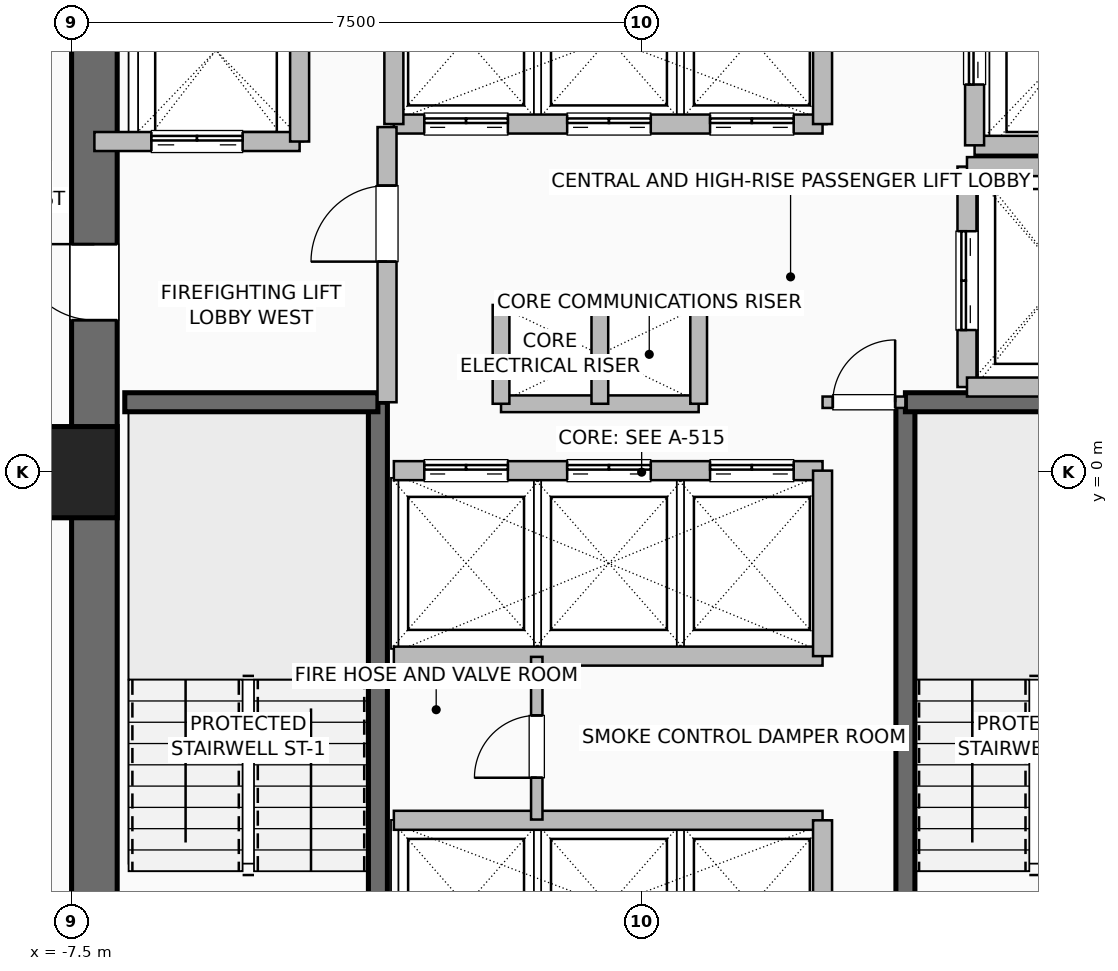
"""IFC4 building model, lengths in metres.
Left out: names, types, materials, properties, quantities, classifications, styles, units other than length and angle.
Written with IfcOpenShell. Run it as: python <this file> out.ifc"""

import sys

from ifc_helpers import new_model, si_unit, direction, frame, frame_2d, origin, origin_2d, place, context, subcontext, project, spatial, rectangle, hollow_rectangle, extrude, element, fill, save


model = new_model("IFC4")
c1 = context("Model", 3, precision=1e-05, world=origin(), true_north=direction((0.0, 1.0)))
c2 = subcontext(c1, "Body", "Model", "MODEL_VIEW")
j1 = project(units=[si_unit("LENGTHUNIT", "METRE"), si_unit("PLANEANGLEUNIT", "RADIAN")], contexts=[c1])
p1 = place(None, origin())
s1 = spatial("IfcSite", under=j1, at=p1, CompositionType="ELEMENT")
p2 = place(p1, origin())
s2 = spatial("IfcBuilding", under=s1, at=p2, CompositionType="ELEMENT")
p3 = place(p2, frame((0.0, 0.0, 55.0)))
s3 = spatial("IfcBuildingStorey", under=s2, at=p3, CompositionType="ELEMENT", Elevation=55.0)
p4 = place(p3, frame((-7.5, 0.0, 0.0), z_axis=(0.0, 0.0, 1.0), x_axis=(1.0, 0.0, 0.0)))
e1 = element("IfcColumn", 1, at=p4, inside=s3, PredefinedType="COLUMN", context=c2, shape_type="SweptSolid", body=[
    extrude(hollow_rectangle(XDim=1.2, YDim=1.2, WallThickness=0.055, at=origin_2d()), origin(), (0.0, 0.0, 1.0), 3.5),
])
p5 = place(p3, frame((-7.2, -7.5, 0.0), z_axis=(0.0, 0.0, 1.0), x_axis=(0.0, 1.0, 0.0)))
e2 = element("IfcWall", 2, at=p5, inside=s3, PredefinedType="SHEAR", context=c2, shape_type="SweptSolid", body=[
    extrude(rectangle(XDim=15.0, YDim=0.6, at=frame_2d((7.5, 0.0))), origin(), (0.0, 0.0, 1.0), 3.25),
])
p6 = place(p5, frame((9.5, 0.0, 0.0)))
e3 = element("IfcOpeningElement", 3, at=p6, cuts=e2, PredefinedType="OPENING", context=c2, shape_type="SweptSolid", body=[
    extrude(rectangle(XDim=1.0, YDim=2.08, at=frame_2d((0.5, 1.04))), frame((0.0, 0.31, 0.0), z_axis=(0.0, -1.0, 0.0), x_axis=(1.0, 0.0, 0.0)), (0.0, 0.0, 1.0), 0.62),
])
p7 = place(p3, frame((-3.47, -6.8, 0.0), z_axis=(0.0, 0.0, 1.0), x_axis=(0.0, 1.0, 0.0)))
e4 = element("IfcWall", 4, at=p7, inside=s3, PredefinedType="SHEAR", context=c2, shape_type="SweptSolid", body=[
    extrude(rectangle(XDim=7.72, YDim=0.25, at=frame_2d((3.86, 0.0))), origin(), (0.0, 0.0, 1.0), 3.25),
])
p8 = place(p3, frame((-6.8, 0.92, 0.0), z_axis=(0.0, 0.0, 1.0), x_axis=(1.0, 0.0, 0.0)))
e5 = element("IfcWall", 5, at=p8, inside=s3, PredefinedType="SHEAR", context=c2, shape_type="SweptSolid", body=[
    extrude(rectangle(XDim=3.33, YDim=0.25, at=frame_2d((1.665, 0.0))), origin(), (0.0, 0.0, 1.0), 3.25),
])
p9 = place(p3, frame((3.47, -6.8, 0.0), z_axis=(0.0, 0.0, 1.0), x_axis=(0.0, 1.0, 0.0)))
e6 = element("IfcWall", 6, at=p9, inside=s3, PredefinedType="SHEAR", context=c2, shape_type="SweptSolid", body=[
    extrude(rectangle(XDim=7.72, YDim=0.25, at=frame_2d((3.86, 0.0))), origin(), (0.0, 0.0, 1.0), 3.25),
])
p10 = place(p3, frame((3.47, 0.92, 0.0), z_axis=(0.0, 0.0, 1.0), x_axis=(1.0, 0.0, 0.0)))
e7 = element("IfcWall", 7, at=p10, inside=s3, PredefinedType="SHEAR", context=c2, shape_type="SweptSolid", body=[
    extrude(rectangle(XDim=3.33, YDim=0.25, at=frame_2d((1.665, 0.0))), origin(), (0.0, 0.0, 1.0), 3.25),
])
for number, where, z_axis, x_axis in (
    (8, (-1.85, 2.2, 0.0), (0.0, 0.0, 1.0), (1.0, 0.0, 0.0)),
    (9, (-1.85, 0.9, 0.0), (0.0, 0.0, 1.0), (1.0, 0.0, 0.0)),
):
    element("IfcWall", number, at=place(p3, frame(where, z_axis=z_axis, x_axis=x_axis)), inside=s3, PredefinedType="PARTITIONING", context=c2, shape_type="SweptSolid", body=[
        extrude(rectangle(XDim=2.6, YDim=0.22, at=frame_2d((1.3, 0.0))), origin(), (0.0, 0.0, 1.0), 3.25),
    ])
for number, where, z_axis, x_axis in (
    (10, (-0.55, 0.9, 0.0), (0.0, 0.0, 1.0), (0.0, 1.0, 0.0)),
    (11, (0.75, 0.9, 0.0), (0.0, 0.0, 1.0), (0.0, 1.0, 0.0)),
    (12, (-1.85, 0.9, 0.0), (0.0, 0.0, 1.0), (0.0, 1.0, 0.0)),
):
    element("IfcWall", number, at=place(p3, frame(where, z_axis=z_axis, x_axis=x_axis)), inside=s3, PredefinedType="PARTITIONING", context=c2, shape_type="SweptSolid", body=[
        extrude(rectangle(XDim=1.3, YDim=0.22, at=frame_2d((0.65, 0.0))), origin(), (0.0, 0.0, 1.0), 3.25),
    ])
p11 = place(p3, frame((-3.26, -4.58, 0.0), z_axis=(0.0, 0.0, 1.0), x_axis=(1.0, 0.0, 0.0)))
e13 = element("IfcWall", 13, at=p11, inside=s3, PredefinedType="SHEAR", context=c2, shape_type="SweptSolid", body=[
    extrude(rectangle(XDim=5.64, YDim=0.25, at=frame_2d((2.82, 0.0))), origin(), (0.0, 0.0, 1.0), 3.25),
])
p12 = place(p3, frame((2.38, -6.8, 0.0), z_axis=(0.0, 0.0, 1.0), x_axis=(0.0, 1.0, 0.0)))
e14 = element("IfcWall", 14, at=p12, inside=s3, PredefinedType="SHEAR", context=c2, shape_type="SweptSolid", body=[
    extrude(rectangle(XDim=2.22, YDim=0.25, at=frame_2d((1.11, 0.0))), origin(), (0.0, 0.0, 1.0), 3.25),
])
p13 = place(p3, frame((-3.26, 0.02, 0.0), z_axis=(0.0, 0.0, 1.0), x_axis=(1.0, 0.0, 0.0)))
e15 = element("IfcWall", 15, at=p13, inside=s3, PredefinedType="SHEAR", context=c2, shape_type="SweptSolid", body=[
    extrude(rectangle(XDim=5.64, YDim=0.25, at=frame_2d((2.82, 0.0))), origin(), (0.0, 0.0, 1.0), 3.25),
])
p14 = place(p13, frame((0.4, 0.0, 0.0)))
e16 = element("IfcOpeningElement", 16, at=p14, cuts=e15, PredefinedType="OPENING", context=c2, shape_type="SweptSolid", body=[
    extrude(rectangle(XDim=1.1, YDim=2.2, at=frame_2d((0.55, 1.1))), frame((0.0, 0.135, 0.0), z_axis=(0.0, -1.0, 0.0), x_axis=(1.0, 0.0, 0.0)), (0.0, 0.0, 1.0), 0.27),
])
p15 = place(p13, frame((2.28, 0.0, 0.0)))
e17 = element("IfcOpeningElement", 17, at=p15, cuts=e15, PredefinedType="OPENING", context=c2, shape_type="SweptSolid", body=[
    extrude(rectangle(XDim=1.1, YDim=2.2, at=frame_2d((0.55, 1.1))), frame((0.0, 0.135, 0.0), z_axis=(0.0, -1.0, 0.0), x_axis=(1.0, 0.0, 0.0)), (0.0, 0.0, 1.0), 0.27),
])
p16 = place(p13, frame((4.16, 0.0, 0.0)))
e18 = element("IfcOpeningElement", 18, at=p16, cuts=e15, PredefinedType="OPENING", context=c2, shape_type="SweptSolid", body=[
    extrude(rectangle(XDim=1.1, YDim=2.2, at=frame_2d((0.55, 1.1))), frame((0.0, 0.135, 0.0), z_axis=(0.0, -1.0, 0.0), x_axis=(1.0, 0.0, 0.0)), (0.0, 0.0, 1.0), 0.27),
])
p17 = place(p3, frame((-3.26, -2.42, 0.0), z_axis=(0.0, 0.0, 1.0), x_axis=(1.0, 0.0, 0.0)))
e19 = element("IfcWall", 19, at=p17, inside=s3, PredefinedType="SHEAR", context=c2, shape_type="SweptSolid", body=[
    extrude(rectangle(XDim=5.64, YDim=0.25, at=frame_2d((2.82, 0.0))), origin(), (0.0, 0.0, 1.0), 3.25),
])
p18 = place(p3, frame((2.38, -2.42, 0.0), z_axis=(0.0, 0.0, 1.0), x_axis=(0.0, 1.0, 0.0)))
e20 = element("IfcWall", 20, at=p18, inside=s3, PredefinedType="SHEAR", context=c2, shape_type="SweptSolid", body=[
    extrude(rectangle(XDim=2.44, YDim=0.25, at=frame_2d((1.22, 0.0))), origin(), (0.0, 0.0, 1.0), 3.25),
])
p19 = place(p3, frame((-3.26, 4.58, 0.0), z_axis=(0.0, 0.0, 1.0), x_axis=(1.0, 0.0, 0.0)))
e21 = element("IfcWall", 21, at=p19, inside=s3, PredefinedType="SHEAR", context=c2, shape_type="SweptSolid", body=[
    extrude(rectangle(XDim=5.64, YDim=0.25, at=frame_2d((2.82, 0.0))), origin(), (0.0, 0.0, 1.0), 3.25),
])
p20 = place(p19, frame((0.4, 0.0, 0.0)))
e22 = element("IfcOpeningElement", 22, at=p20, cuts=e21, PredefinedType="OPENING", context=c2, shape_type="SweptSolid", body=[
    extrude(rectangle(XDim=1.1, YDim=2.2, at=frame_2d((0.55, 1.1))), frame((0.0, 0.135, 0.0), z_axis=(0.0, -1.0, 0.0), x_axis=(1.0, 0.0, 0.0)), (0.0, 0.0, 1.0), 0.27),
])
p21 = place(p19, frame((2.28, 0.0, 0.0)))
e23 = element("IfcOpeningElement", 23, at=p21, cuts=e21, PredefinedType="OPENING", context=c2, shape_type="SweptSolid", body=[
    extrude(rectangle(XDim=1.1, YDim=2.2, at=frame_2d((0.55, 1.1))), frame((0.0, 0.135, 0.0), z_axis=(0.0, -1.0, 0.0), x_axis=(1.0, 0.0, 0.0)), (0.0, 0.0, 1.0), 0.27),
])
p22 = place(p19, frame((4.16, 0.0, 0.0)))
e24 = element("IfcOpeningElement", 24, at=p22, cuts=e21, PredefinedType="OPENING", context=c2, shape_type="SweptSolid", body=[
    extrude(rectangle(XDim=1.1, YDim=2.2, at=frame_2d((0.55, 1.1))), frame((0.0, 0.135, 0.0), z_axis=(0.0, -1.0, 0.0), x_axis=(1.0, 0.0, 0.0)), (0.0, 0.0, 1.0), 0.27),
])
for number, where, z_axis, x_axis in (
    (25, (-3.26, 4.58, 0.0), (0.0, 0.0, 1.0), (0.0, 1.0, 0.0)),
    (26, (2.38, 4.58, 0.0), (0.0, 0.0, 1.0), (0.0, 1.0, 0.0)),
):
    element("IfcWall", number, at=place(p3, frame(where, z_axis=z_axis, x_axis=x_axis)), inside=s3, PredefinedType="SHEAR", context=c2, shape_type="SweptSolid", body=[
        extrude(rectangle(XDim=2.22, YDim=0.25, at=frame_2d((1.11, 0.0))), origin(), (0.0, 0.0, 1.0), 3.25),
    ])
p23 = place(p3, frame((-7.2, 4.35, 0.0), z_axis=(0.0, 0.0, 1.0), x_axis=(1.0, 0.0, 0.0)))
e27 = element("IfcWall", 27, at=p23, inside=s3, PredefinedType="SHEAR", context=c2, shape_type="SweptSolid", body=[
    extrude(rectangle(XDim=2.7, YDim=0.25, at=frame_2d((1.35, 0.0))), origin(), (0.0, 0.0, 1.0), 3.25),
])
p24 = place(p23, frame((0.75, 0.0, 0.0)))
e28 = element("IfcOpeningElement", 28, at=p24, cuts=e27, PredefinedType="OPENING", context=c2, shape_type="SweptSolid", body=[
    extrude(rectangle(XDim=1.2, YDim=2.2, at=frame_2d((0.6, 1.1))), frame((0.0, 0.135, 0.0), z_axis=(0.0, -1.0, 0.0), x_axis=(1.0, 0.0, 0.0)), (0.0, 0.0, 1.0), 0.27),
])
p25 = place(p3, frame((-4.5, 4.35, 0.0), z_axis=(0.0, 0.0, 1.0), x_axis=(0.0, 1.0, 0.0)))
e29 = element("IfcWall", 29, at=p25, inside=s3, PredefinedType="SHEAR", context=c2, shape_type="SweptSolid", body=[
    extrude(rectangle(XDim=2.85, YDim=0.25, at=frame_2d((1.425, 0.0))), origin(), (0.0, 0.0, 1.0), 3.25),
])
p26 = place(p3, frame((4.38, 4.3, 0.0), z_axis=(0.0, 0.0, 1.0), x_axis=(1.0, 0.0, 0.0)))
e30 = element("IfcWall", 30, at=p26, inside=s3, PredefinedType="SHEAR", context=c2, shape_type="SweptSolid", body=[
    extrude(rectangle(XDim=2.42, YDim=0.25, at=frame_2d((1.21, 0.0))), origin(), (0.0, 0.0, 1.0), 3.25),
])
p27 = place(p3, frame((4.38, 4.3, 0.0), z_axis=(0.0, 0.0, 1.0), x_axis=(0.0, 1.0, 0.0)))
e31 = element("IfcWall", 31, at=p27, inside=s3, PredefinedType="SHEAR", context=c2, shape_type="SweptSolid", body=[
    extrude(rectangle(XDim=2.5, YDim=0.25, at=frame_2d((1.25, 0.0))), origin(), (0.0, 0.0, 1.0), 3.25),
])
p28 = place(p27, frame((0.8, 0.0, 0.0)))
e32 = element("IfcOpeningElement", 32, at=p28, cuts=e31, PredefinedType="OPENING", context=c2, shape_type="SweptSolid", body=[
    extrude(rectangle(XDim=1.2, YDim=2.2, at=frame_2d((0.6, 1.1))), frame((0.0, 0.135, 0.0), z_axis=(0.0, -1.0, 0.0), x_axis=(1.0, 0.0, 0.0)), (0.0, 0.0, 1.0), 0.27),
])
p29 = place(p3, frame((4.28, 1.12, 0.0), z_axis=(0.0, 0.0, 1.0), x_axis=(0.0, 1.0, 0.0)))
e33 = element("IfcWall", 33, at=p29, inside=s3, PredefinedType="SHEAR", context=c2, shape_type="SweptSolid", body=[
    extrude(rectangle(XDim=2.9, YDim=0.25, at=frame_2d((1.45, 0.0))), origin(), (0.0, 0.0, 1.0), 3.25),
])
p30 = place(p29, frame((0.75, 0.0, 0.0)))
e34 = element("IfcOpeningElement", 34, at=p30, cuts=e33, PredefinedType="OPENING", context=c2, shape_type="SweptSolid", body=[
    extrude(rectangle(XDim=1.3, YDim=2.3, at=frame_2d((0.65, 1.15))), frame((0.0, 0.135, 0.0), z_axis=(0.0, -1.0, 0.0), x_axis=(1.0, 0.0, 0.0)), (0.0, 0.0, 1.0), 0.27),
])
for number, where, z_axis, x_axis in (
    (35, (4.28, 1.12, 0.0), (0.0, 0.0, 1.0), (1.0, 0.0, 0.0)),
    (36, (4.28, 4.02, 0.0), (0.0, 0.0, 1.0), (1.0, 0.0, 0.0)),
):
    element("IfcWall", number, at=place(p3, frame(where, z_axis=z_axis, x_axis=x_axis)), inside=s3, PredefinedType="SHEAR", context=c2, shape_type="SweptSolid", body=[
        extrude(rectangle(XDim=2.52, YDim=0.25, at=frame_2d((1.26, 0.0))), origin(), (0.0, 0.0, 1.0), 3.25),
    ])
p31 = place(p3, frame((-3.35, 0.92, 0.0), z_axis=(0.0, 0.0, 1.0), x_axis=(0.0, 1.0, 0.0)))
e37 = element("IfcWall", 37, at=p31, inside=s3, PredefinedType="SHEAR", context=c2, shape_type="SweptSolid", body=[
    extrude(rectangle(XDim=3.62, YDim=0.25, at=frame_2d((1.81, 0.0))), origin(), (0.0, 0.0, 1.0), 3.25),
])
p32 = place(p31, frame((1.85, 0.0, 0.0)))
e38 = element("IfcOpeningElement", 38, at=p32, cuts=e37, PredefinedType="OPENING", context=c2, shape_type="SweptSolid", body=[
    extrude(rectangle(XDim=1.0, YDim=2.08, at=frame_2d((0.5, 1.04))), frame((0.0, 0.135, 0.0), z_axis=(0.0, -1.0, 0.0), x_axis=(1.0, 0.0, 0.0)), (0.0, 0.0, 1.0), 0.27),
])
p33 = place(p3, frame((2.38, 0.92, 0.0), z_axis=(0.0, 0.0, 1.0), x_axis=(1.0, 0.0, 0.0)))
e39 = element("IfcWall", 39, at=p33, inside=s3, PredefinedType="PARTITIONING", context=c2, shape_type="SweptSolid", body=[
    extrude(rectangle(XDim=1.09, YDim=0.15, at=frame_2d((0.545, 0.0))), origin(), (0.0, 0.0, 1.0), 3.25),
])
p34 = place(p33, frame((0.135, 0.0, 0.0)))
e40 = element("IfcOpeningElement", 40, at=p34, cuts=e39, PredefinedType="OPENING", context=c2, shape_type="SweptSolid", body=[
    extrude(rectangle(XDim=0.82, YDim=2.05, at=frame_2d((0.41, 1.025))), frame((0.0, 0.085, 0.0), z_axis=(0.0, -1.0, 0.0), x_axis=(1.0, 0.0, 0.0)), (0.0, 0.0, 1.0), 0.17),
])
p35 = place(p3, frame((-1.38, -4.57, 0.0), z_axis=(0.0, 0.0, 1.0), x_axis=(0.0, 1.0, 0.0)))
e41 = element("IfcWall", 41, at=p35, inside=s3, PredefinedType="PARTITIONING", context=c2, shape_type="SweptSolid", body=[
    extrude(rectangle(XDim=2.14, YDim=0.15, at=frame_2d((1.07, 0.0))), origin(), (0.0, 0.0, 1.0), 3.25),
])
p36 = place(p35, frame((0.55, 0.0, 0.0)))
e42 = element("IfcOpeningElement", 42, at=p36, cuts=e41, PredefinedType="OPENING", context=c2, shape_type="SweptSolid", body=[
    extrude(rectangle(XDim=0.82, YDim=2.05, at=frame_2d((0.41, 1.025))), frame((0.0, 0.085, 0.0), z_axis=(0.0, -1.0, 0.0), x_axis=(1.0, 0.0, 0.0)), (0.0, 0.0, 1.0), 0.17),
])
p37 = place(p6, origin())
e43 = element("IfcDoor", 43, at=p37, inside=s3, OperationType="SINGLE_SWING_RIGHT", PredefinedType="DOOR", context=c2, shape_type="SweptSolid", body=[
    extrude(rectangle(XDim=1.0, YDim=2.08, at=frame_2d((0.5, 1.04))), frame((0.0, 0.025, 0.0), z_axis=(0.0, -1.0, 0.0), x_axis=(1.0, 0.0, 0.0)), (0.0, 0.0, 1.0), 0.05),
])
fill(e3, e43)
p38 = place(p14, origin())
e44 = element("IfcDoor", 44, at=p38, inside=s3, OperationType="DOUBLE_DOOR_SLIDING", PredefinedType="DOOR", context=c2, shape_type="SweptSolid", body=[
    extrude(rectangle(XDim=1.1, YDim=2.2, at=frame_2d((0.55, 1.1))), frame((0.0, 0.025, 0.0), z_axis=(0.0, -1.0, 0.0), x_axis=(1.0, 0.0, 0.0)), (0.0, 0.0, 1.0), 0.05),
])
fill(e16, e44)
p39 = place(p15, origin())
e45 = element("IfcDoor", 45, at=p39, inside=s3, OperationType="DOUBLE_DOOR_SLIDING", PredefinedType="DOOR", context=c2, shape_type="SweptSolid", body=[
    extrude(rectangle(XDim=1.1, YDim=2.2, at=frame_2d((0.55, 1.1))), frame((0.0, 0.025, 0.0), z_axis=(0.0, -1.0, 0.0), x_axis=(1.0, 0.0, 0.0)), (0.0, 0.0, 1.0), 0.05),
])
fill(e17, e45)
p40 = place(p16, origin())
e46 = element("IfcDoor", 46, at=p40, inside=s3, OperationType="DOUBLE_DOOR_SLIDING", PredefinedType="DOOR", context=c2, shape_type="SweptSolid", body=[
    extrude(rectangle(XDim=1.1, YDim=2.2, at=frame_2d((0.55, 1.1))), frame((0.0, 0.025, 0.0), z_axis=(0.0, -1.0, 0.0), x_axis=(1.0, 0.0, 0.0)), (0.0, 0.0, 1.0), 0.05),
])
fill(e18, e46)
p41 = place(p20, origin())
e47 = element("IfcDoor", 47, at=p41, inside=s3, OperationType="DOUBLE_DOOR_SLIDING", PredefinedType="DOOR", context=c2, shape_type="SweptSolid", body=[
    extrude(rectangle(XDim=1.1, YDim=2.2, at=frame_2d((0.55, 1.1))), frame((0.0, 0.025, 0.0), z_axis=(0.0, -1.0, 0.0), x_axis=(1.0, 0.0, 0.0)), (0.0, 0.0, 1.0), 0.05),
])
fill(e22, e47)
p42 = place(p21, origin())
e48 = element("IfcDoor", 48, at=p42, inside=s3, OperationType="DOUBLE_DOOR_SLIDING", PredefinedType="DOOR", context=c2, shape_type="SweptSolid", body=[
    extrude(rectangle(XDim=1.1, YDim=2.2, at=frame_2d((0.55, 1.1))), frame((0.0, 0.025, 0.0), z_axis=(0.0, -1.0, 0.0), x_axis=(1.0, 0.0, 0.0)), (0.0, 0.0, 1.0), 0.05),
])
fill(e23, e48)
p43 = place(p22, origin())
e49 = element("IfcDoor", 49, at=p43, inside=s3, OperationType="DOUBLE_DOOR_SLIDING", PredefinedType="DOOR", context=c2, shape_type="SweptSolid", body=[
    extrude(rectangle(XDim=1.1, YDim=2.2, at=frame_2d((0.55, 1.1))), frame((0.0, 0.025, 0.0), z_axis=(0.0, -1.0, 0.0), x_axis=(1.0, 0.0, 0.0)), (0.0, 0.0, 1.0), 0.05),
])
fill(e24, e49)
p44 = place(p24, origin())
e50 = element("IfcDoor", 50, at=p44, inside=s3, OperationType="DOUBLE_DOOR_SLIDING", PredefinedType="DOOR", context=c2, shape_type="SweptSolid", body=[
    extrude(rectangle(XDim=1.2, YDim=2.2, at=frame_2d((0.6, 1.1))), frame((0.0, 0.025, 0.0), z_axis=(0.0, -1.0, 0.0), x_axis=(1.0, 0.0, 0.0)), (0.0, 0.0, 1.0), 0.05),
])
fill(e28, e50)
p45 = place(p28, origin())
e51 = element("IfcDoor", 51, at=p45, inside=s3, OperationType="DOUBLE_DOOR_SLIDING", PredefinedType="DOOR", context=c2, shape_type="SweptSolid", body=[
    extrude(rectangle(XDim=1.2, YDim=2.2, at=frame_2d((0.6, 1.1))), frame((0.0, 0.025, 0.0), z_axis=(0.0, -1.0, 0.0), x_axis=(1.0, 0.0, 0.0)), (0.0, 0.0, 1.0), 0.05),
])
fill(e32, e51)
p46 = place(p30, origin())
e52 = element("IfcDoor", 52, at=p46, inside=s3, OperationType="DOUBLE_DOOR_SLIDING", PredefinedType="DOOR", context=c2, shape_type="SweptSolid", body=[
    extrude(rectangle(XDim=1.3, YDim=2.3, at=frame_2d((0.65, 1.15))), frame((0.0, 0.025, 0.0), z_axis=(0.0, -1.0, 0.0), x_axis=(1.0, 0.0, 0.0)), (0.0, 0.0, 1.0), 0.05),
])
fill(e34, e52)
p47 = place(p32, origin())
e53 = element("IfcDoor", 53, at=p47, inside=s3, OperationType="SINGLE_SWING_LEFT", PredefinedType="DOOR", context=c2, shape_type="SweptSolid", body=[
    extrude(rectangle(XDim=1.0, YDim=2.08, at=frame_2d((0.5, 1.04))), frame((0.0, 0.025, 0.0), z_axis=(0.0, -1.0, 0.0), x_axis=(1.0, 0.0, 0.0)), (0.0, 0.0, 1.0), 0.05),
])
fill(e38, e53)
p48 = place(p34, origin())
e54 = element("IfcDoor", 54, at=p48, inside=s3, OperationType="SINGLE_SWING_RIGHT", PredefinedType="DOOR", context=c2, shape_type="SweptSolid", body=[
    extrude(rectangle(XDim=0.82, YDim=2.05, at=frame_2d((0.41, 1.025))), frame((0.0, 0.025, 0.0), z_axis=(0.0, -1.0, 0.0), x_axis=(1.0, 0.0, 0.0)), (0.0, 0.0, 1.0), 0.05),
])
fill(e40, e54)
p49 = place(p36, origin())
e55 = element("IfcDoor", 55, at=p49, inside=s3, OperationType="SINGLE_SWING_LEFT", PredefinedType="DOOR", context=c2, shape_type="SweptSolid", body=[
    extrude(rectangle(XDim=0.82, YDim=2.05, at=frame_2d((0.41, 1.025))), frame((0.0, 0.025, 0.0), z_axis=(0.0, -1.0, 0.0), x_axis=(1.0, 0.0, 0.0)), (0.0, 0.0, 1.0), 0.05),
])
fill(e42, e55)
save(model, sys.argv[1])
